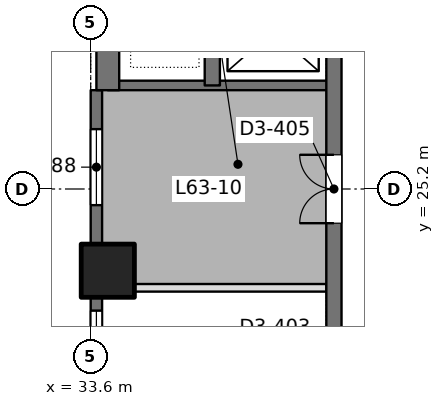
"""IFC4 building model, lengths in metres.
Left out: names, types, materials, properties, quantities, classifications, styles, units other than length and angle.
Written with IfcOpenShell. Run it as: python <this file> out.ifc"""

import sys

from ifc_helpers import new_model, si_unit, direction, frame, frame_2d, origin, origin_2d, place, context, subcontext, project, spatial, rectangle, extrude, element, fill, save


model = new_model("IFC4")
c1 = context("Model", 3, precision=1e-05, world=origin(), true_north=direction((0.0, 1.0)))
c2 = subcontext(c1, "Body", "Model", "MODEL_VIEW")
j1 = project(units=[si_unit("LENGTHUNIT", "METRE"), si_unit("PLANEANGLEUNIT", "RADIAN")], contexts=[c1])
p1 = place(None, origin())
s1 = spatial("IfcSite", under=j1, at=p1, CompositionType="ELEMENT")
p2 = place(p1, origin())
s2 = spatial("IfcBuilding", under=s1, at=p2, CompositionType="ELEMENT")
p3 = place(p2, frame((0.0, 0.0, 277.2)))
s3 = spatial("IfcBuildingStorey", under=s2, at=p3, CompositionType="ELEMENT", Elevation=277.2)
p4 = place(p3, frame((34.05, 23.05, 0.0), z_axis=(0.0, 0.0, 1.0), x_axis=(1.0, 0.0, 0.0)))
e1 = element("IfcColumn", 1, at=p4, inside=s3, PredefinedType="COLUMN", context=c2, shape_type="SweptSolid", body=[
    extrude(rectangle(XDim=1.4, YDim=1.4, at=origin_2d()), origin(), (0.0, 0.0, 1.0), 4.5),
])
p5 = place(p3, frame((34.05, 27.8, 0.0), z_axis=(0.0, 0.0, 1.0), x_axis=(0.0, 1.0, 0.0)))
e2 = element("IfcWall", 2, at=p5, inside=s3, PredefinedType="SHEAR", context=c2, shape_type="SweptSolid", body=[
    extrude(rectangle(XDim=9.55, YDim=0.6, at=frame_2d((4.775, 0.0))), origin(), (0.0, 0.0, 1.0), 4.5),
])
p6 = place(p3, frame((40.0, 13.05, 0.0), z_axis=(0.0, 0.0, 1.0), x_axis=(0.0, 1.0, 0.0)))
e3 = element("IfcWall", 3, at=p6, inside=s3, PredefinedType="SHEAR", context=c2, shape_type="SweptSolid", body=[
    extrude(rectangle(XDim=24.3, YDim=0.4, at=frame_2d((12.15, 0.0))), origin(), (0.0, 0.0, 1.0), 4.5),
])
p7 = place(p6, frame((15.75, 0.0, 0.0)))
e4 = element("IfcOpeningElement", 4, at=p7, cuts=e3, PredefinedType="OPENING", context=c2, shape_type="SweptSolid", body=[
    extrude(rectangle(XDim=1.1, YDim=2.2, at=frame_2d((0.55, 1.1))), frame((0.0, 0.21, 0.0), z_axis=(0.0, -1.0, 0.0), x_axis=(1.0, 0.0, 0.0)), (0.0, 0.0, 1.0), 0.42),
])
p8 = place(p6, frame((18.6, 0.0, 0.0)))
e5 = element("IfcOpeningElement", 5, at=p8, cuts=e3, PredefinedType="OPENING", context=c2, shape_type="SweptSolid", body=[
    extrude(rectangle(XDim=1.1, YDim=2.2, at=frame_2d((0.55, 1.1))), frame((0.0, 0.21, 0.0), z_axis=(0.0, -1.0, 0.0), x_axis=(1.0, 0.0, 0.0)), (0.0, 0.0, 1.0), 0.42),
])
p9 = place(p6, frame((21.45, 0.0, 0.0)))
e6 = element("IfcOpeningElement", 6, at=p9, cuts=e3, PredefinedType="OPENING", context=c2, shape_type="SweptSolid", body=[
    extrude(rectangle(XDim=1.1, YDim=2.2, at=frame_2d((0.55, 1.1))), frame((0.0, 0.21, 0.0), z_axis=(0.0, -1.0, 0.0), x_axis=(1.0, 0.0, 0.0)), (0.0, 0.0, 1.0), 0.42),
])
p10 = place(p6, frame((6.05, 0.0, 0.0)))
e7 = element("IfcOpeningElement", 7, at=p10, cuts=e3, PredefinedType="OPENING", context=c2, shape_type="SweptSolid", body=[
    extrude(rectangle(XDim=1.8, YDim=2.4, at=frame_2d((0.9, 1.2))), frame((0.0, 0.21, 0.0), z_axis=(0.0, -1.0, 0.0), x_axis=(1.0, 0.0, 0.0)), (0.0, 0.0, 1.0), 0.42),
])
p11 = place(p6, frame((11.25, 0.0, 0.0)))
e8 = element("IfcOpeningElement", 8, at=p11, cuts=e3, PredefinedType="OPENING", context=c2, shape_type="SweptSolid", body=[
    extrude(rectangle(XDim=1.8, YDim=2.4, at=frame_2d((0.9, 1.2))), frame((0.0, 0.21, 0.0), z_axis=(0.0, -1.0, 0.0), x_axis=(1.0, 0.0, 0.0)), (0.0, 0.0, 1.0), 0.42),
])
p12 = place(p3, frame((36.8, 27.925, 0.0), z_axis=(0.0, 0.0, 1.0), x_axis=(0.0, 1.0, 0.0)))
e9 = element("IfcWall", 9, at=p12, inside=s3, PredefinedType="SHEAR", context=c2, shape_type="SweptSolid", body=[
    extrude(rectangle(XDim=9.425, YDim=0.4, at=frame_2d((4.712, 0.0))), origin(), (0.0, 0.0, 1.0), 4.5),
])
p13 = place(p3, frame((40.0, 27.925, 0.0), z_axis=(0.0, 0.0, 1.0), x_axis=(-1.0, 0.0, 0.0)))
e10 = element("IfcWall", 10, at=p13, inside=s3, PredefinedType="SHEAR", context=c2, shape_type="SweptSolid", body=[
    extrude(rectangle(XDim=5.95, YDim=0.25, at=frame_2d((2.975, 0.0))), origin(), (0.0, 0.0, 1.0), 4.5),
])
p14 = place(p3, frame((33.75, 17.1, 0.0), z_axis=(0.0, 0.0, 1.0), x_axis=(0.0, 1.0, 0.0)))
e11 = element("IfcWall", 11, at=p14, inside=s3, PredefinedType="SOLIDWALL", context=c2, shape_type="SweptSolid", body=[
    extrude(rectangle(XDim=10.7, YDim=0.3, at=frame_2d((5.35, 0.0))), origin(), (0.0, 0.0, 1.0), 4.3),
])
p15 = place(p14, frame((0.55, 0.0, 0.1)))
e12 = element("IfcOpeningElement", 12, at=p15, cuts=e11, PredefinedType="OPENING", context=c2, shape_type="SweptSolid", body=[
    extrude(rectangle(XDim=2.0, YDim=3.0, at=frame_2d((1.0, 1.5))), frame((0.0, 0.16, 0.0), z_axis=(0.0, -1.0, 0.0), x_axis=(1.0, 0.0, 0.0)), (0.0, 0.0, 1.0), 0.32),
])
p16 = place(p14, frame((2.9, 0.0, 0.1)))
e13 = element("IfcOpeningElement", 13, at=p16, cuts=e11, PredefinedType="OPENING", context=c2, shape_type="SweptSolid", body=[
    extrude(rectangle(XDim=2.0, YDim=3.0, at=frame_2d((1.0, 1.5))), frame((0.0, 0.16, 0.0), z_axis=(0.0, -1.0, 0.0), x_axis=(1.0, 0.0, 0.0)), (0.0, 0.0, 1.0), 0.32),
])
p17 = place(p14, frame((7.675, 0.0, 0.1)))
e14 = element("IfcOpeningElement", 14, at=p17, cuts=e11, PredefinedType="OPENING", context=c2, shape_type="SweptSolid", body=[
    extrude(rectangle(XDim=2.0, YDim=3.0, at=frame_2d((1.0, 1.5))), frame((0.0, 0.16, 0.0), z_axis=(0.0, -1.0, 0.0), x_axis=(1.0, 0.0, 0.0)), (0.0, 0.0, 1.0), 0.32),
])
p18 = place(p3, frame((34.749, 22.6, 0.0), z_axis=(0.0, 0.0, 1.0), x_axis=(1.0, 0.0, 0.0)))
e15 = element("IfcWall", 15, at=p18, inside=s3, PredefinedType="PARTITIONING", context=c2, shape_type="SweptSolid", body=[
    extrude(rectangle(XDim=5.053, YDim=0.2, at=frame_2d((2.526, 0.0))), origin(), (0.0, 0.0, 1.0), 4.3),
])
p19 = place(p16, origin())
e16 = element("IfcWindow", 16, at=p19, inside=s3, PartitioningType="SINGLE_PANEL", PredefinedType="WINDOW", context=c2, shape_type="SweptSolid", body=[
    extrude(rectangle(XDim=2.0, YDim=3.0, at=frame_2d((1.0, 1.5))), frame((0.0, 0.03, 0.0), z_axis=(0.0, -1.0, 0.0), x_axis=(1.0, 0.0, 0.0)), (0.0, 0.0, 1.0), 0.06),
])
fill(e13, e16)
p20 = place(p17, origin())
e17 = element("IfcWindow", 17, at=p20, inside=s3, PartitioningType="SINGLE_PANEL", PredefinedType="WINDOW", context=c2, shape_type="SweptSolid", body=[
    extrude(rectangle(XDim=2.0, YDim=3.0, at=frame_2d((1.0, 1.5))), frame((0.0, 0.03, 0.0), z_axis=(0.0, -1.0, 0.0), x_axis=(1.0, 0.0, 0.0)), (0.0, 0.0, 1.0), 0.06),
])
fill(e14, e17)
p21 = place(p11, origin())
e18 = element("IfcDoor", 18, at=p21, inside=s3, OperationType="DOUBLE_DOOR_SINGLE_SWING", PredefinedType="DOOR", context=c2, shape_type="SweptSolid", body=[
    extrude(rectangle(XDim=1.8, YDim=2.4, at=frame_2d((0.9, 1.2))), frame((0.0, 0.025, 0.0), z_axis=(0.0, -1.0, 0.0), x_axis=(1.0, 0.0, 0.0)), (0.0, 0.0, 1.0), 0.05),
])
fill(e8, e18)
save(model, sys.argv[1])
